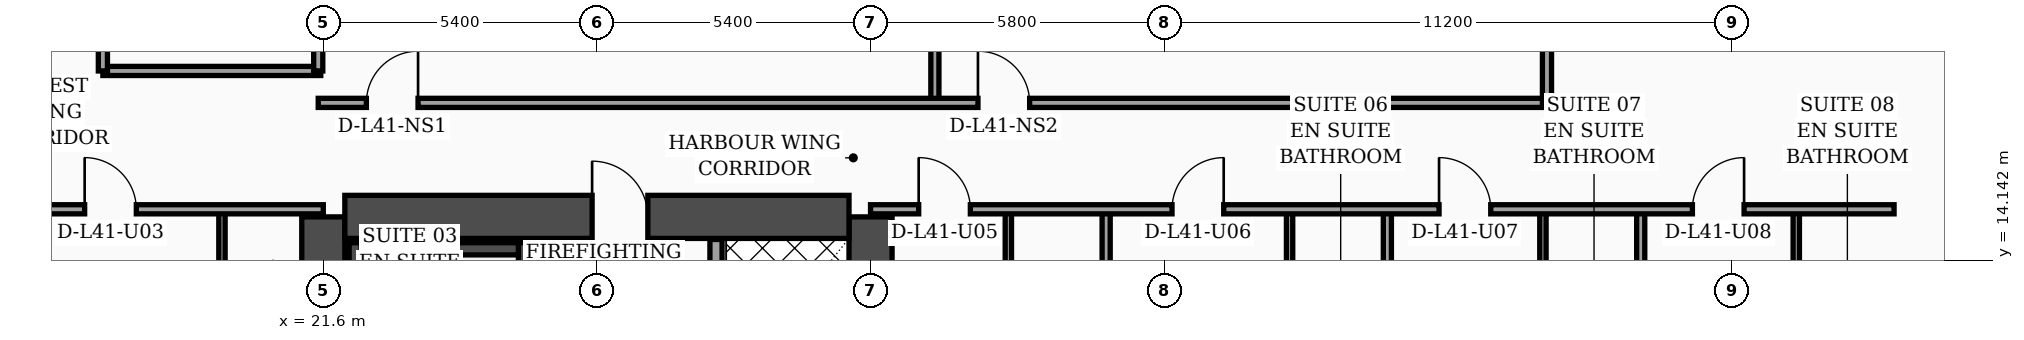
"""IFC4 building model, lengths in metres.
Left out: names, types, materials, properties, quantities, classifications, styles, units other than length and angle.
Written with IfcOpenShell. Run it as: python <this file> out.ifc"""

import sys

from ifc_helpers import new_model, si_unit, direction, frame, frame_2d, origin, place, context, subcontext, project, spatial, rectangle, extrude, element, fill, save


model = new_model("IFC4")
c1 = context("Model", 3, precision=1e-05, world=origin(), true_north=direction((0.0, 1.0)))
c2 = subcontext(c1, "Body", "Model", "MODEL_VIEW")
j1 = project(units=[si_unit("LENGTHUNIT", "METRE"), si_unit("PLANEANGLEUNIT", "RADIAN")], contexts=[c1])
p1 = place(None, origin())
s1 = spatial("IfcSite", under=j1, at=p1, CompositionType="ELEMENT")
p2 = place(p1, origin())
s2 = spatial("IfcBuilding", under=s1, at=p2, CompositionType="ELEMENT")
p3 = place(p2, frame((0.0, 0.0, 167.5)))
s3 = spatial("IfcBuildingStorey", under=s2, at=p3, CompositionType="ELEMENT", Elevation=167.5)
for number, where, z_axis, x_axis in (
    (1, (21.6, 4.6, 0.0), (0.0, 0.0, 1.0), (0.0, 1.0, 0.0)),
    (2, (32.4, 4.6, 0.0), (0.0, 0.0, 1.0), (0.0, 1.0, 0.0)),
):
    element("IfcWall", number, at=place(p3, frame(where, z_axis=z_axis, x_axis=x_axis)), inside=s3, PredefinedType="SHEAR", context=c2, shape_type="SweptSolid", body=[
        extrude(rectangle(XDim=10.4, YDim=0.85, at=frame_2d((5.2, 0.0))), origin(), (0.0, 0.0, 1.0), 3.56),
    ])
p4 = place(p3, frame((22.025, 15.0, 0.0), z_axis=(0.0, 0.0, 1.0), x_axis=(1.0, 0.0, 0.0)))
e3 = element("IfcWall", 3, at=p4, inside=s3, PredefinedType="SHEAR", context=c2, shape_type="SweptSolid", body=[
    extrude(rectangle(XDim=9.95, YDim=0.85, at=frame_2d((4.975, 0.0))), origin(), (0.0, 0.0, 1.0), 3.56),
])
p5 = place(p4, frame((4.88, 0.0, 0.0)))
e4 = element("IfcOpeningElement", 4, at=p5, cuts=e3, PredefinedType="OPENING", context=c2, shape_type="SweptSolid", body=[
    extrude(rectangle(XDim=1.1, YDim=2.2, at=frame_2d((0.55, 1.1))), frame((0.0, 0.435, 0.0), z_axis=(0.0, -1.0, 0.0), x_axis=(1.0, 0.0, 0.0)), (0.0, 0.0, 1.0), 0.87),
])
p6 = place(p3, frame((22.23, 5.025, 0.0), z_axis=(0.0, 0.0, 1.0), x_axis=(0.0, 1.0, 0.0)))
e5 = element("IfcWall", 5, at=p6, inside=s3, PredefinedType="SOLIDWALL", context=c2, shape_type="SweptSolid", body=[
    extrude(rectangle(XDim=9.465, YDim=0.24, at=frame_2d((4.732, 0.0))), origin(), (0.0, 0.0, 1.0), 3.56),
])
p7 = place(p3, frame((25.57, 5.025, 0.0), z_axis=(0.0, 0.0, 1.0), x_axis=(0.0, 1.0, 0.0)))
e6 = element("IfcWall", 6, at=p7, inside=s3, PredefinedType="SOLIDWALL", context=c2, shape_type="SweptSolid", body=[
    extrude(rectangle(XDim=9.465, YDim=0.24, at=frame_2d((4.732, 0.0))), origin(), (0.0, 0.0, 1.0), 3.56),
])
p8 = place(p7, frame((0.35, 0.0, 0.0)))
e7 = element("IfcOpeningElement", 7, at=p8, cuts=e6, PredefinedType="OPENING", context=c2, shape_type="SweptSolid", body=[
    extrude(rectangle(XDim=1.15, YDim=2.2, at=frame_2d((0.575, 1.1))), frame((0.0, 0.13, 0.0), z_axis=(0.0, -1.0, 0.0), x_axis=(1.0, 0.0, 0.0)), (0.0, 0.0, 1.0), 0.26),
])
p9 = place(p3, frame((22.35, 14.37, 0.0), z_axis=(0.0, 0.0, 1.0), x_axis=(1.0, 0.0, 0.0)))
e8 = element("IfcWall", 8, at=p9, inside=s3, PredefinedType="SOLIDWALL", context=c2, shape_type="SweptSolid", body=[
    extrude(rectangle(XDim=3.1, YDim=0.24, at=frame_2d((1.55, 0.0))), origin(), (0.0, 0.0, 1.0), 3.56),
])
p10 = place(p3, frame((59.23, 5.505, 0.0), z_axis=(0.0, 0.0, 1.0), x_axis=(-0.300509063924, 0.953778958931, 0.0)))
e9 = element("IfcWall", 9, at=p10, inside=s3, PredefinedType="SOLIDWALL", context=c2, shape_type="SweptSolid", body=[
    extrude(rectangle(XDim=30.814, YDim=0.32, at=frame_2d((15.407, 0.0))), origin(), (0.0, 0.0, 1.0), 3.56),
])
p11 = place(p10, frame((4.747, 0.0, 0.0)))
e10 = element("IfcOpeningElement", 10, at=p11, cuts=e9, PredefinedType="OPENING", context=c2, shape_type="SweptSolid", body=[
    extrude(rectangle(XDim=1.4, YDim=2.25, at=frame_2d((0.7, 1.125))), frame((0.0, 0.17, 0.0), z_axis=(0.0, -1.0, 0.0), x_axis=(1.0, 0.0, 0.0)), (0.0, 0.0, 1.0), 0.34),
])
p12 = place(p10, frame((1.6, 0.0, 0.75)))
e11 = element("IfcOpeningElement", 11, at=p12, cuts=e9, PredefinedType="OPENING", context=c2, shape_type="SweptSolid", body=[
    extrude(rectangle(XDim=1.5, YDim=1.6, at=frame_2d((0.75, 0.8))), frame((0.0, 0.17, 0.0), z_axis=(0.0, -1.0, 0.0), x_axis=(1.0, 0.0, 0.0)), (0.0, 0.0, 1.0), 0.34),
])
p13 = place(p10, frame((7.8, 0.0, 0.75)))
e12 = element("IfcOpeningElement", 12, at=p13, cuts=e9, PredefinedType="OPENING", context=c2, shape_type="SweptSolid", body=[
    extrude(rectangle(XDim=1.5, YDim=1.6, at=frame_2d((0.75, 0.8))), frame((0.0, 0.17, 0.0), z_axis=(0.0, -1.0, 0.0), x_axis=(1.0, 0.0, 0.0)), (0.0, 0.0, 1.0), 0.34),
])
p14 = place(p10, frame((10.9, 0.0, 0.75)))
e13 = element("IfcOpeningElement", 13, at=p14, cuts=e9, PredefinedType="OPENING", context=c2, shape_type="SweptSolid", body=[
    extrude(rectangle(XDim=1.5, YDim=1.6, at=frame_2d((0.75, 0.8))), frame((0.0, 0.17, 0.0), z_axis=(0.0, -1.0, 0.0), x_axis=(1.0, 0.0, 0.0)), (0.0, 0.0, 1.0), 0.34),
])
p15 = place(p10, frame((14.0, 0.0, 0.75)))
e14 = element("IfcOpeningElement", 14, at=p15, cuts=e9, PredefinedType="OPENING", context=c2, shape_type="SweptSolid", body=[
    extrude(rectangle(XDim=1.5, YDim=1.6, at=frame_2d((0.75, 0.8))), frame((0.0, 0.17, 0.0), z_axis=(0.0, -1.0, 0.0), x_axis=(1.0, 0.0, 0.0)), (0.0, 0.0, 1.0), 0.34),
])
p16 = place(p10, frame((17.1, 0.0, 0.75)))
e15 = element("IfcOpeningElement", 15, at=p16, cuts=e9, PredefinedType="OPENING", context=c2, shape_type="SweptSolid", body=[
    extrude(rectangle(XDim=1.5, YDim=1.6, at=frame_2d((0.75, 0.8))), frame((0.0, 0.17, 0.0), z_axis=(0.0, -1.0, 0.0), x_axis=(1.0, 0.0, 0.0)), (0.0, 0.0, 1.0), 0.34),
])
p17 = place(p10, frame((20.2, 0.0, 0.75)))
e16 = element("IfcOpeningElement", 16, at=p17, cuts=e9, PredefinedType="OPENING", context=c2, shape_type="SweptSolid", body=[
    extrude(rectangle(XDim=1.5, YDim=1.6, at=frame_2d((0.75, 0.8))), frame((0.0, 0.17, 0.0), z_axis=(0.0, -1.0, 0.0), x_axis=(1.0, 0.0, 0.0)), (0.0, 0.0, 1.0), 0.34),
])
p18 = place(p10, frame((23.3, 0.0, 0.75)))
e17 = element("IfcOpeningElement", 17, at=p18, cuts=e9, PredefinedType="OPENING", context=c2, shape_type="SweptSolid", body=[
    extrude(rectangle(XDim=1.5, YDim=1.6, at=frame_2d((0.75, 0.8))), frame((0.0, 0.17, 0.0), z_axis=(0.0, -1.0, 0.0), x_axis=(1.0, 0.0, 0.0)), (0.0, 0.0, 1.0), 0.34),
])
p19 = place(p10, frame((26.4, 0.0, 0.75)))
e18 = element("IfcOpeningElement", 18, at=p19, cuts=e9, PredefinedType="OPENING", context=c2, shape_type="SweptSolid", body=[
    extrude(rectangle(XDim=1.5, YDim=1.6, at=frame_2d((0.75, 0.8))), frame((0.0, 0.17, 0.0), z_axis=(0.0, -1.0, 0.0), x_axis=(1.0, 0.0, 0.0)), (0.0, 0.0, 1.0), 0.34),
])
p20 = place(p3, frame((29.35, 5.045, 0.0), z_axis=(0.0, 0.0, 1.0), x_axis=(0.0, 1.0, 0.0)))
e19 = element("IfcWall", 19, at=p20, inside=s3, PredefinedType="SOLIDWALL", context=c2, shape_type="SweptSolid", body=[
    extrude(rectangle(XDim=9.51, YDim=0.24, at=frame_2d((4.755, 0.0))), origin(), (0.0, 0.0, 1.0), 3.56),
])
p21 = place(p20, frame((0.55, 0.0, 0.0)))
e20 = element("IfcOpeningElement", 20, at=p21, cuts=e19, PredefinedType="OPENING", context=c2, shape_type="SweptSolid", body=[
    extrude(rectangle(XDim=1.3, YDim=2.35, at=frame_2d((0.65, 1.175))), frame((0.0, 0.13, 0.0), z_axis=(0.0, -1.0, 0.0), x_axis=(1.0, 0.0, 0.0)), (0.0, 0.0, 1.0), 0.26),
])
p22 = place(p3, frame((19.6, 2.44, 0.0), z_axis=(0.0, 0.0, 1.0), x_axis=(0.0, 1.0, 0.0)))
e21 = element("IfcWall", 21, at=p22, inside=s3, PredefinedType="PARTITIONING", context=c2, shape_type="SweptSolid", body=[
    extrude(rectangle(XDim=12.71, YDim=0.125, at=frame_2d((6.355, 0.0))), origin(), (0.0, 0.0, 1.0), 2.49),
])
p23 = place(p22, frame((4.34, 0.0, 0.0)))
e22 = element("IfcOpeningElement", 22, at=p23, cuts=e21, PredefinedType="OPENING", context=c2, shape_type="SweptSolid", body=[
    extrude(rectangle(XDim=0.96, YDim=2.2, at=frame_2d((0.48, 1.1))), frame((0.0, 0.073, 0.0), z_axis=(0.0, -1.0, 0.0), x_axis=(1.0, 0.0, 0.0)), (0.0, 0.0, 1.0), 0.145),
])
p24 = place(p22, frame((10.18, 0.0, 0.0)))
e23 = element("IfcOpeningElement", 23, at=p24, cuts=e21, PredefinedType="OPENING", context=c2, shape_type="SweptSolid", body=[
    extrude(rectangle(XDim=0.9, YDim=2.15, at=frame_2d((0.45, 1.075))), frame((0.0, 0.073, 0.0), z_axis=(0.0, -1.0, 0.0), x_axis=(1.0, 0.0, 0.0)), (0.0, 0.0, 1.0), 0.145),
])
p25 = place(p3, frame((15.15, 15.15, 0.0), z_axis=(0.0, 0.0, 1.0), x_axis=(1.0, 0.0, 0.0)))
e24 = element("IfcWall", 24, at=p25, inside=s3, PredefinedType="PARTITIONING", context=c2, shape_type="SweptSolid", body=[
    extrude(rectangle(XDim=6.45, YDim=0.18, at=frame_2d((3.225, 0.0))), origin(), (0.0, 0.0, 1.0), 2.49),
])
p26 = place(p25, frame((1.74, 0.0, 0.0)))
e25 = element("IfcOpeningElement", 25, at=p26, cuts=e24, PredefinedType="OPENING", context=c2, shape_type="SweptSolid", body=[
    extrude(rectangle(XDim=1.02, YDim=2.2, at=frame_2d((0.51, 1.1))), frame((0.0, 0.1, 0.0), z_axis=(0.0, -1.0, 0.0), x_axis=(1.0, 0.0, 0.0)), (0.0, 0.0, 1.0), 0.2),
])
p27 = place(p3, frame((17.25, 17.88, 0.0), z_axis=(0.0, 0.0, 1.0), x_axis=(1.0, 0.0, 0.0)))
e26 = element("IfcWall", 26, at=p27, inside=s3, PredefinedType="PARTITIONING", context=c2, shape_type="SweptSolid", body=[
    extrude(rectangle(XDim=4.3, YDim=0.18, at=frame_2d((2.15, 0.0))), origin(), (0.0, 0.0, 1.0), 3.56),
])
p28 = place(p3, frame((21.5, 17.88, 0.0), z_axis=(0.0, 0.0, 1.0), x_axis=(0.0, 1.0, 0.0)))
e27 = element("IfcWall", 27, at=p28, inside=s3, PredefinedType="PARTITIONING", context=c2, shape_type="SweptSolid", body=[
    extrude(rectangle(XDim=6.44, YDim=0.18, at=frame_2d((3.22, 0.0))), origin(), (0.0, 0.0, 1.0), 3.56),
])
p29 = place(p3, frame((17.25, 17.88, 0.0), z_axis=(0.0, 0.0, 1.0), x_axis=(0.0, 1.0, 0.0)))
e28 = element("IfcWall", 28, at=p29, inside=s3, PredefinedType="PARTITIONING", context=c2, shape_type="SweptSolid", body=[
    extrude(rectangle(XDim=6.44, YDim=0.18, at=frame_2d((3.22, 0.0))), origin(), (0.0, 0.0, 1.0), 3.56),
])
p30 = place(p29, frame((0.65, 0.0, 0.0)))
e29 = element("IfcOpeningElement", 29, at=p30, cuts=e28, PredefinedType="OPENING", context=c2, shape_type="SweptSolid", body=[
    extrude(rectangle(XDim=0.98, YDim=2.15, at=frame_2d((0.49, 1.075))), frame((0.0, 0.1, 0.0), z_axis=(0.0, -1.0, 0.0), x_axis=(1.0, 0.0, 0.0)), (0.0, 0.0, 1.0), 0.2),
])
p31 = place(p29, frame((3.27, 0.0, 0.0)))
e30 = element("IfcOpeningElement", 30, at=p31, cuts=e28, PredefinedType="OPENING", context=c2, shape_type="SweptSolid", body=[
    extrude(rectangle(XDim=0.96, YDim=2.2, at=frame_2d((0.48, 1.1))), frame((0.0, 0.1, 0.0), z_axis=(0.0, -1.0, 0.0), x_axis=(1.0, 0.0, 0.0)), (0.0, 0.0, 1.0), 0.2),
])
p32 = place(p3, frame((35.12, 2.44, 0.0), z_axis=(0.0, 0.0, 1.0), x_axis=(0.0, 1.0, 0.0)))
e31 = element("IfcWall", 31, at=p32, inside=s3, PredefinedType="PARTITIONING", context=c2, shape_type="SweptSolid", body=[
    extrude(rectangle(XDim=12.71, YDim=0.125, at=frame_2d((6.355, 0.0))), origin(), (0.0, 0.0, 1.0), 2.94),
])
p33 = place(p32, frame((4.35, 0.0, 0.0)))
e32 = element("IfcOpeningElement", 32, at=p33, cuts=e31, PredefinedType="OPENING", context=c2, shape_type="SweptSolid", body=[
    extrude(rectangle(XDim=0.96, YDim=2.2, at=frame_2d((0.48, 1.1))), frame((0.0, 0.073, 0.0), z_axis=(0.0, -1.0, 0.0), x_axis=(1.0, 0.0, 0.0)), (0.0, 0.0, 1.0), 0.145),
])
p34 = place(p32, frame((10.21, 0.0, 0.0)))
e33 = element("IfcOpeningElement", 33, at=p34, cuts=e31, PredefinedType="OPENING", context=c2, shape_type="SweptSolid", body=[
    extrude(rectangle(XDim=0.9, YDim=2.15, at=frame_2d((0.45, 1.075))), frame((0.0, 0.073, 0.0), z_axis=(0.0, -1.0, 0.0), x_axis=(1.0, 0.0, 0.0)), (0.0, 0.0, 1.0), 0.145),
])
p35 = place(p3, frame((40.67, 2.44, 0.0), z_axis=(0.0, 0.0, 1.0), x_axis=(0.0, 1.0, 0.0)))
e34 = element("IfcWall", 34, at=p35, inside=s3, PredefinedType="PARTITIONING", context=c2, shape_type="SweptSolid", body=[
    extrude(rectangle(XDim=12.71, YDim=0.125, at=frame_2d((6.355, 0.0))), origin(), (0.0, 0.0, 1.0), 2.94),
])
p36 = place(p35, frame((4.35, 0.0, 0.0)))
e35 = element("IfcOpeningElement", 35, at=p36, cuts=e34, PredefinedType="OPENING", context=c2, shape_type="SweptSolid", body=[
    extrude(rectangle(XDim=0.96, YDim=2.2, at=frame_2d((0.48, 1.1))), frame((0.0, 0.073, 0.0), z_axis=(0.0, -1.0, 0.0), x_axis=(1.0, 0.0, 0.0)), (0.0, 0.0, 1.0), 0.145),
])
p37 = place(p35, frame((10.21, 0.0, 0.0)))
e36 = element("IfcOpeningElement", 36, at=p37, cuts=e34, PredefinedType="OPENING", context=c2, shape_type="SweptSolid", body=[
    extrude(rectangle(XDim=0.9, YDim=2.15, at=frame_2d((0.45, 1.075))), frame((0.0, 0.073, 0.0), z_axis=(0.0, -1.0, 0.0), x_axis=(1.0, 0.0, 0.0)), (0.0, 0.0, 1.0), 0.145),
])
p38 = place(p3, frame((37.05, 2.44, 0.0), z_axis=(0.0, 0.0, 1.0), x_axis=(0.0, 1.0, 0.0)))
e37 = element("IfcWall", 37, at=p38, inside=s3, PredefinedType="PARTITIONING", context=c2, shape_type="SweptSolid", body=[
    extrude(rectangle(XDim=12.71, YDim=0.16, at=frame_2d((6.355, 0.0))), origin(), (0.0, 0.0, 1.0), 2.94),
])
p39 = place(p3, frame((45.67, 2.44, 0.0), z_axis=(0.0, 0.0, 1.0), x_axis=(0.0, 1.0, 0.0)))
e38 = element("IfcWall", 38, at=p39, inside=s3, PredefinedType="PARTITIONING", context=c2, shape_type="SweptSolid", body=[
    extrude(rectangle(XDim=12.71, YDim=0.125, at=frame_2d((6.355, 0.0))), origin(), (0.0, 0.0, 1.0), 3.04),
])
p40 = place(p39, frame((4.35, 0.0, 0.0)))
e39 = element("IfcOpeningElement", 39, at=p40, cuts=e38, PredefinedType="OPENING", context=c2, shape_type="SweptSolid", body=[
    extrude(rectangle(XDim=0.96, YDim=2.2, at=frame_2d((0.48, 1.1))), frame((0.0, 0.073, 0.0), z_axis=(0.0, -1.0, 0.0), x_axis=(1.0, 0.0, 0.0)), (0.0, 0.0, 1.0), 0.145),
])
p41 = place(p39, frame((10.21, 0.0, 0.0)))
e40 = element("IfcOpeningElement", 40, at=p41, cuts=e38, PredefinedType="OPENING", context=c2, shape_type="SweptSolid", body=[
    extrude(rectangle(XDim=0.9, YDim=2.15, at=frame_2d((0.45, 1.075))), frame((0.0, 0.073, 0.0), z_axis=(0.0, -1.0, 0.0), x_axis=(1.0, 0.0, 0.0)), (0.0, 0.0, 1.0), 0.145),
])
p42 = place(p3, frame((42.6, 2.44, 0.0), z_axis=(0.0, 0.0, 1.0), x_axis=(0.0, 1.0, 0.0)))
e41 = element("IfcWall", 41, at=p42, inside=s3, PredefinedType="PARTITIONING", context=c2, shape_type="SweptSolid", body=[
    extrude(rectangle(XDim=12.71, YDim=0.16, at=frame_2d((6.355, 0.0))), origin(), (0.0, 0.0, 1.0), 3.04),
])
p43 = place(p3, frame((50.67, 2.44, 0.0), z_axis=(0.0, 0.0, 1.0), x_axis=(0.0, 1.0, 0.0)))
e42 = element("IfcWall", 42, at=p43, inside=s3, PredefinedType="PARTITIONING", context=c2, shape_type="SweptSolid", body=[
    extrude(rectangle(XDim=12.71, YDim=0.125, at=frame_2d((6.355, 0.0))), origin(), (0.0, 0.0, 1.0), 3.04),
])
p44 = place(p43, frame((4.35, 0.0, 0.0)))
e43 = element("IfcOpeningElement", 43, at=p44, cuts=e42, PredefinedType="OPENING", context=c2, shape_type="SweptSolid", body=[
    extrude(rectangle(XDim=0.96, YDim=2.2, at=frame_2d((0.48, 1.1))), frame((0.0, 0.073, 0.0), z_axis=(0.0, -1.0, 0.0), x_axis=(1.0, 0.0, 0.0)), (0.0, 0.0, 1.0), 0.145),
])
p45 = place(p43, frame((10.21, 0.0, 0.0)))
e44 = element("IfcOpeningElement", 44, at=p45, cuts=e42, PredefinedType="OPENING", context=c2, shape_type="SweptSolid", body=[
    extrude(rectangle(XDim=0.9, YDim=2.15, at=frame_2d((0.45, 1.075))), frame((0.0, 0.073, 0.0), z_axis=(0.0, -1.0, 0.0), x_axis=(1.0, 0.0, 0.0)), (0.0, 0.0, 1.0), 0.145),
])
p46 = place(p3, frame((47.6, 2.44, 0.0), z_axis=(0.0, 0.0, 1.0), x_axis=(0.0, 1.0, 0.0)))
e45 = element("IfcWall", 45, at=p46, inside=s3, PredefinedType="PARTITIONING", context=c2, shape_type="SweptSolid", body=[
    extrude(rectangle(XDim=12.71, YDim=0.16, at=frame_2d((6.355, 0.0))), origin(), (0.0, 0.0, 1.0), 2.94),
])
p47 = place(p3, frame((32.4, 15.15, 0.0), z_axis=(0.0, 0.0, 1.0), x_axis=(1.0, 0.0, 0.0)))
e46 = element("IfcWall", 46, at=p47, inside=s3, PredefinedType="PARTITIONING", context=c2, shape_type="SweptSolid", body=[
    extrude(rectangle(XDim=20.2, YDim=0.18, at=frame_2d((10.1, 0.0))), origin(), (0.0, 0.0, 1.0), 2.94),
])
p48 = place(p47, frame((0.95, 0.0, 0.0)))
e47 = element("IfcOpeningElement", 47, at=p48, cuts=e46, PredefinedType="OPENING", context=c2, shape_type="SweptSolid", body=[
    extrude(rectangle(XDim=1.02, YDim=2.2, at=frame_2d((0.51, 1.1))), frame((0.0, 0.1, 0.0), z_axis=(0.0, -1.0, 0.0), x_axis=(1.0, 0.0, 0.0)), (0.0, 0.0, 1.0), 0.2),
])
p49 = place(p47, frame((5.95, 0.0, 0.0)))
e48 = element("IfcOpeningElement", 48, at=p49, cuts=e46, PredefinedType="OPENING", context=c2, shape_type="SweptSolid", body=[
    extrude(rectangle(XDim=1.02, YDim=2.2, at=frame_2d((0.51, 1.1))), frame((0.0, 0.1, 0.0), z_axis=(0.0, -1.0, 0.0), x_axis=(1.0, 0.0, 0.0)), (0.0, 0.0, 1.0), 0.2),
])
p50 = place(p47, frame((11.22, 0.0, 0.0)))
e49 = element("IfcOpeningElement", 49, at=p50, cuts=e46, PredefinedType="OPENING", context=c2, shape_type="SweptSolid", body=[
    extrude(rectangle(XDim=1.02, YDim=2.2, at=frame_2d((0.51, 1.1))), frame((0.0, 0.1, 0.0), z_axis=(0.0, -1.0, 0.0), x_axis=(1.0, 0.0, 0.0)), (0.0, 0.0, 1.0), 0.2),
])
p51 = place(p47, frame((16.22, 0.0, 0.0)))
e50 = element("IfcOpeningElement", 50, at=p51, cuts=e46, PredefinedType="OPENING", context=c2, shape_type="SweptSolid", body=[
    extrude(rectangle(XDim=1.02, YDim=2.2, at=frame_2d((0.51, 1.1))), frame((0.0, 0.1, 0.0), z_axis=(0.0, -1.0, 0.0), x_axis=(1.0, 0.0, 0.0)), (0.0, 0.0, 1.0), 0.2),
])
p52 = place(p3, frame((33.67, 17.25, 0.0), z_axis=(0.0, 0.0, 1.0), x_axis=(0.0, 1.0, 0.0)))
e51 = element("IfcWall", 51, at=p52, inside=s3, PredefinedType="PARTITIONING", context=c2, shape_type="SweptSolid", body=[
    extrude(rectangle(XDim=13.96, YDim=0.16, at=frame_2d((6.98, 0.0))), origin(), (0.0, 0.0, 1.0), 2.94),
])
p53 = place(p3, frame((21.5, 17.25, 0.0), z_axis=(0.0, 0.0, 1.0), x_axis=(1.0, 0.0, 0.0)))
e52 = element("IfcWall", 52, at=p53, inside=s3, PredefinedType="PARTITIONING", context=c2, shape_type="SweptSolid", body=[
    extrude(rectangle(XDim=24.25, YDim=0.18, at=frame_2d((12.125, 0.0))), origin(), (0.0, 0.0, 1.0), 2.94),
])
p54 = place(p53, frame((0.95, 0.0, 0.0)))
e53 = element("IfcOpeningElement", 53, at=p54, cuts=e52, PredefinedType="OPENING", context=c2, shape_type="SweptSolid", body=[
    extrude(rectangle(XDim=1.02, YDim=2.2, at=frame_2d((0.51, 1.1))), frame((0.0, 0.1, 0.0), z_axis=(0.0, -1.0, 0.0), x_axis=(1.0, 0.0, 0.0)), (0.0, 0.0, 1.0), 0.2),
])
p55 = place(p53, frame((13.02, 0.0, 0.0)))
e54 = element("IfcOpeningElement", 54, at=p55, cuts=e52, PredefinedType="OPENING", context=c2, shape_type="SweptSolid", body=[
    extrude(rectangle(XDim=1.02, YDim=2.2, at=frame_2d((0.51, 1.1))), frame((0.0, 0.1, 0.0), z_axis=(0.0, -1.0, 0.0), x_axis=(1.0, 0.0, 0.0)), (0.0, 0.0, 1.0), 0.2),
])
p56 = place(p3, frame((45.75, 17.25, 0.0), z_axis=(0.0, 0.0, 1.0), x_axis=(0.0, 1.0, 0.0)))
e55 = element("IfcWall", 55, at=p56, inside=s3, PredefinedType="PARTITIONING", context=c2, shape_type="SweptSolid", body=[
    extrude(rectangle(XDim=20.69, YDim=0.18, at=frame_2d((10.345, 0.0))), origin(), (0.0, 0.0, 1.0), 2.94),
])
p57 = place(p26, origin())
e56 = element("IfcDoor", 56, at=p57, inside=s3, OperationType="SINGLE_SWING_LEFT", PredefinedType="DOOR", context=c2, shape_type="SweptSolid", body=[
    extrude(rectangle(XDim=1.02, YDim=2.2, at=frame_2d((0.51, 1.1))), frame((0.0, 0.025, 0.0), z_axis=(0.0, -1.0, 0.0), x_axis=(1.0, 0.0, 0.0)), (0.0, 0.0, 1.0), 0.05),
])
fill(e25, e56)
p58 = place(p48, origin())
e57 = element("IfcDoor", 57, at=p58, inside=s3, OperationType="SINGLE_SWING_LEFT", PredefinedType="DOOR", context=c2, shape_type="SweptSolid", body=[
    extrude(rectangle(XDim=1.02, YDim=2.2, at=frame_2d((0.51, 1.1))), frame((0.0, 0.025, 0.0), z_axis=(0.0, -1.0, 0.0), x_axis=(1.0, 0.0, 0.0)), (0.0, 0.0, 1.0), 0.05),
])
fill(e47, e57)
p59 = place(p49, origin())
e58 = element("IfcDoor", 58, at=p59, inside=s3, OperationType="SINGLE_SWING_RIGHT", PredefinedType="DOOR", context=c2, shape_type="SweptSolid", body=[
    extrude(rectangle(XDim=1.02, YDim=2.2, at=frame_2d((0.51, 1.1))), frame((0.0, 0.025, 0.0), z_axis=(0.0, -1.0, 0.0), x_axis=(1.0, 0.0, 0.0)), (0.0, 0.0, 1.0), 0.05),
])
fill(e48, e58)
p60 = place(p50, origin())
e59 = element("IfcDoor", 59, at=p60, inside=s3, OperationType="SINGLE_SWING_LEFT", PredefinedType="DOOR", context=c2, shape_type="SweptSolid", body=[
    extrude(rectangle(XDim=1.02, YDim=2.2, at=frame_2d((0.51, 1.1))), frame((0.0, 0.025, 0.0), z_axis=(0.0, -1.0, 0.0), x_axis=(1.0, 0.0, 0.0)), (0.0, 0.0, 1.0), 0.05),
])
fill(e49, e59)
p61 = place(p51, origin())
e60 = element("IfcDoor", 60, at=p61, inside=s3, OperationType="SINGLE_SWING_RIGHT", PredefinedType="DOOR", context=c2, shape_type="SweptSolid", body=[
    extrude(rectangle(XDim=1.02, YDim=2.2, at=frame_2d((0.51, 1.1))), frame((0.0, 0.025, 0.0), z_axis=(0.0, -1.0, 0.0), x_axis=(1.0, 0.0, 0.0)), (0.0, 0.0, 1.0), 0.05),
])
fill(e50, e60)
p62 = place(p54, origin())
e61 = element("IfcDoor", 61, at=p62, inside=s3, OperationType="SINGLE_SWING_RIGHT", PredefinedType="DOOR", context=c2, shape_type="SweptSolid", body=[
    extrude(rectangle(XDim=1.02, YDim=2.2, at=frame_2d((0.51, 1.1))), frame((0.0, 0.025, 0.0), z_axis=(0.0, -1.0, 0.0), x_axis=(1.0, 0.0, 0.0)), (0.0, 0.0, 1.0), 0.05),
])
fill(e53, e61)
p63 = place(p55, origin())
e62 = element("IfcDoor", 62, at=p63, inside=s3, OperationType="SINGLE_SWING_LEFT", PredefinedType="DOOR", context=c2, shape_type="SweptSolid", body=[
    extrude(rectangle(XDim=1.02, YDim=2.2, at=frame_2d((0.51, 1.1))), frame((0.0, 0.025, 0.0), z_axis=(0.0, -1.0, 0.0), x_axis=(1.0, 0.0, 0.0)), (0.0, 0.0, 1.0), 0.05),
])
fill(e54, e62)
p64 = place(p5, origin())
e63 = element("IfcDoor", 63, at=p64, inside=s3, OperationType="SINGLE_SWING_LEFT", PredefinedType="DOOR", context=c2, shape_type="SweptSolid", body=[
    extrude(rectangle(XDim=1.1, YDim=2.2, at=frame_2d((0.55, 1.1))), frame((0.0, 0.025, 0.0), z_axis=(0.0, -1.0, 0.0), x_axis=(1.0, 0.0, 0.0)), (0.0, 0.0, 1.0), 0.05),
])
fill(e4, e63)
save(model, sys.argv[1])
